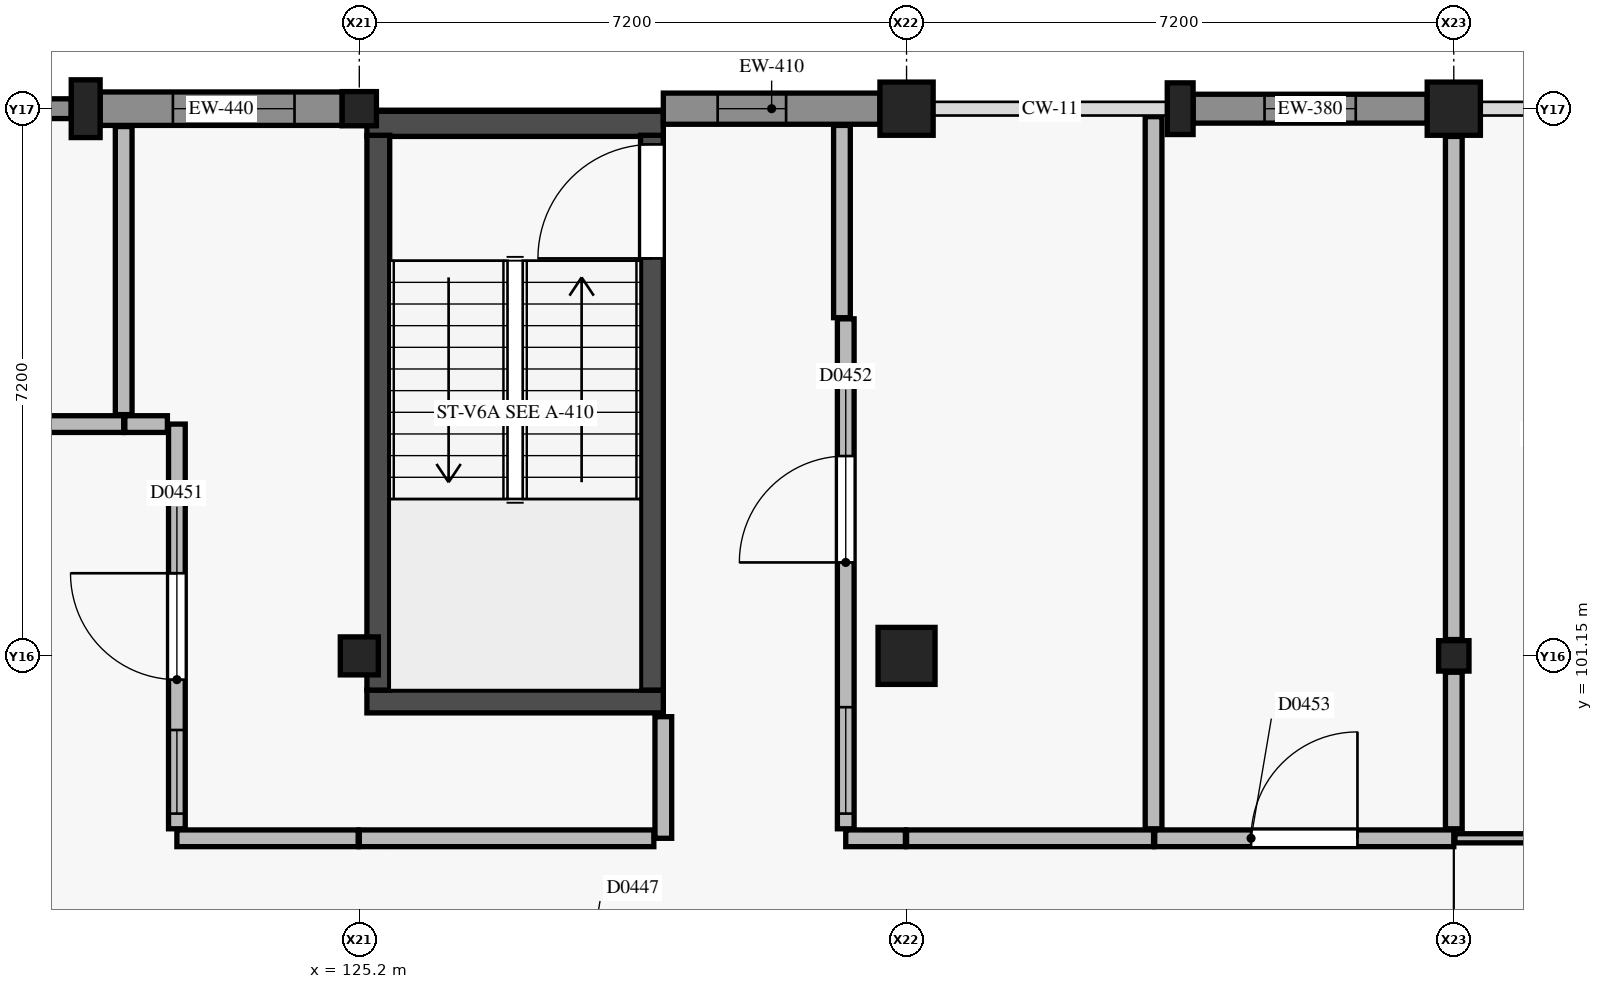
"""IFC4 building model, lengths in metres.
Left out: names, types, materials, properties, quantities, classifications, styles, units other than length and angle.
Written with IfcOpenShell. Run it as: python <this file> out.ifc"""

import sys

from ifc_helpers import new_model, si_unit, direction, frame, frame_2d, origin, origin_2d, place, context, subcontext, project, spatial, rectangle, circle, extrude, element, fill, save


model = new_model("IFC4")
c1 = context("Model", 3, precision=1e-05, world=origin(), true_north=direction((0.0, 1.0)))
c2 = subcontext(c1, "Body", "Model", "MODEL_VIEW")
j1 = project(units=[si_unit("LENGTHUNIT", "METRE"), si_unit("PLANEANGLEUNIT", "RADIAN")], contexts=[c1])
p1 = place(None, origin())
s1 = spatial("IfcSite", under=j1, at=p1, CompositionType="ELEMENT")
p2 = place(p1, origin())
s2 = spatial("IfcBuilding", under=s1, at=p2, CompositionType="ELEMENT")
p3 = place(p2, frame((0.0, 0.0, 4.8)))
s3 = spatial("IfcBuildingStorey", under=s2, at=p3, CompositionType="ELEMENT", Elevation=4.8)
p4 = place(p3, frame((125.2, 101.15, 0.0), z_axis=(0.0, 0.0, 1.0), x_axis=(1.0, 0.0, 0.0)))
e1 = element("IfcColumn", 1, at=p4, inside=s3, PredefinedType="COLUMN", context=c2, shape_type="SweptSolid", body=[
    extrude(rectangle(XDim=0.5, YDim=0.5, at=origin_2d()), origin(), (0.0, 0.0, 1.0), 4.2),
])
p5 = place(p3, frame((125.2, 108.35, 0.0), z_axis=(0.0, 0.0, 1.0), x_axis=(1.0, 0.0, 0.0)))
e2 = element("IfcColumn", 2, at=p5, inside=s3, PredefinedType="COLUMN", context=c2, shape_type="SweptSolid", body=[
    extrude(rectangle(XDim=0.45, YDim=0.45, at=origin_2d()), origin(), (0.0, 0.0, 1.0), 4.2),
])
p6 = place(p3, frame((132.4, 101.15, 0.0), z_axis=(0.0, 0.0, 1.0), x_axis=(1.0, 0.0, 0.0)))
e3 = element("IfcColumn", 3, at=p6, inside=s3, PredefinedType="COLUMN", context=c2, shape_type="SweptSolid", body=[
    extrude(rectangle(XDim=0.75, YDim=0.75, at=origin_2d()), origin(), (0.0, 0.0, 1.0), 4.2),
])
p7 = place(p3, frame((132.4, 108.35, 0.0), z_axis=(0.0, 0.0, 1.0), x_axis=(1.0, 0.0, 0.0)))
e4 = element("IfcColumn", 4, at=p7, inside=s3, PredefinedType="COLUMN", context=c2, shape_type="SweptSolid", body=[
    extrude(rectangle(XDim=0.7, YDim=0.7, at=origin_2d()), origin(), (0.0, 0.0, 1.0), 4.2),
])
p8 = place(p3, frame((139.6, 101.15, 0.0), z_axis=(0.0, 0.0, 1.0), x_axis=(1.0, 0.0, 0.0)))
e5 = element("IfcColumn", 5, at=p8, inside=s3, PredefinedType="COLUMN", context=c2, shape_type="SweptSolid", body=[
    extrude(rectangle(XDim=0.4, YDim=0.4, at=origin_2d()), origin(), (0.0, 0.0, 1.0), 4.2),
])
p9 = place(p3, frame((139.6, 108.35, 0.0), z_axis=(0.0, 0.0, 1.0), x_axis=(1.0, 0.0, 0.0)))
e6 = element("IfcColumn", 6, at=p9, inside=s3, PredefinedType="COLUMN", context=c2, shape_type="SweptSolid", body=[
    extrude(circle(Radius=0.35, at=origin_2d()), origin(), (0.0, 0.0, 1.0), 4.2),
])
p10 = place(p3, frame((121.6, 108.35, 0.0), z_axis=(0.0, 0.0, 1.0), x_axis=(1.0, 0.0, 0.0)))
e7 = element("IfcColumn", 7, at=p10, inside=s3, PredefinedType="PILASTER", context=c2, shape_type="SweptSolid", body=[
    extrude(rectangle(XDim=0.38, YDim=0.76, at=origin_2d()), origin(), (0.0, 0.0, 1.0), 4.2),
])
p11 = place(p3, frame((136.0, 108.35, 0.0), z_axis=(0.0, 0.0, 1.0), x_axis=(1.0, 0.0, 0.0)))
e8 = element("IfcColumn", 8, at=p11, inside=s3, PredefinedType="PILASTER", context=c2, shape_type="SweptSolid", body=[
    extrude(rectangle(XDim=0.34, YDim=0.68, at=origin_2d()), origin(), (0.0, 0.0, 1.0), 4.2),
])
p12 = place(p3, frame((125.3, 100.55, 0.0), z_axis=(0.0, 0.0, 1.0), x_axis=(1.0, 0.0, 0.0)))
e9 = element("IfcWall", 9, at=p12, inside=s3, PredefinedType="SHEAR", context=c2, shape_type="SweptSolid", body=[
    extrude(rectangle(XDim=3.9, YDim=0.3, at=frame_2d((1.95, 0.0))), origin(), (0.0, 0.0, 1.0), 3.95),
])
p13 = place(p3, frame((125.3, 108.15, 0.0), z_axis=(0.0, 0.0, 1.0), x_axis=(1.0, 0.0, 0.0)))
e10 = element("IfcWall", 10, at=p13, inside=s3, PredefinedType="SHEAR", context=c2, shape_type="SweptSolid", body=[
    extrude(rectangle(XDim=3.9, YDim=0.33, at=frame_2d((1.95, 0.0))), origin(), (0.0, 0.0, 1.0), 3.95),
])
p14 = place(p3, frame((125.45, 100.7, 0.0), z_axis=(0.0, 0.0, 1.0), x_axis=(0.0, 1.0, 0.0)))
e11 = element("IfcWall", 11, at=p14, inside=s3, PredefinedType="SHEAR", context=c2, shape_type="SweptSolid", body=[
    extrude(rectangle(XDim=7.3, YDim=0.3, at=frame_2d((3.65, 0.0))), origin(), (0.0, 0.0, 1.0), 3.95),
])
p15 = place(p3, frame((129.05, 100.7, 0.0), z_axis=(0.0, 0.0, 1.0), x_axis=(0.0, 1.0, 0.0)))
e12 = element("IfcWall", 12, at=p15, inside=s3, PredefinedType="SHEAR", context=c2, shape_type="SweptSolid", body=[
    extrude(rectangle(XDim=7.3, YDim=0.3, at=frame_2d((3.65, 0.0))), origin(), (0.0, 0.0, 1.0), 3.95),
])
p16 = place(p15, frame((5.68, 0.0, 0.0)))
e13 = element("IfcOpeningElement", 13, at=p16, cuts=e12, PredefinedType="OPENING", context=c2, shape_type="SweptSolid", body=[
    extrude(rectangle(XDim=1.5, YDim=2.15, at=frame_2d((0.75, 1.075))), frame((0.0, 0.16, 0.0), z_axis=(0.0, -1.0, 0.0), x_axis=(1.0, 0.0, 0.0)), (0.0, 0.0, 1.0), 0.32),
])
p17 = place(p3, frame((118.3, 108.35, 0.0), z_axis=(0.0, 0.0, 1.0), x_axis=(1.0, 0.0, 0.0)))
e14 = element("IfcWall", 14, at=p17, inside=s3, PredefinedType="SOLIDWALL", context=c2, shape_type="SweptSolid", body=[
    extrude(rectangle(XDim=3.11, YDim=0.26, at=frame_2d((1.555, 0.0))), origin(), (0.0, 0.0, 1.0), 3.13),
])
p18 = place(p17, frame((0.855, 0.0, 0.9)))
e15 = element("IfcOpeningElement", 15, at=p18, cuts=e14, PredefinedType="OPENING", context=c2, shape_type="SweptSolid", body=[
    extrude(rectangle(XDim=1.4, YDim=1.8, at=frame_2d((0.7, 0.9))), frame((0.0, 0.14, 0.0), z_axis=(0.0, -1.0, 0.0), x_axis=(1.0, 0.0, 0.0)), (0.0, 0.0, 1.0), 0.28),
])
p19 = place(p3, frame((121.79, 108.35, 0.0), z_axis=(0.0, 0.0, 1.0), x_axis=(1.0, 0.0, 0.0)))
e16 = element("IfcWall", 16, at=p19, inside=s3, PredefinedType="USERDEFINED", context=c2, shape_type="SweptSolid", body=[
    extrude(rectangle(XDim=3.185, YDim=0.44, at=frame_2d((1.593, 0.0))), origin(), (0.0, 0.0, 1.0), 3.13),
])
p20 = place(p19, frame((0.958, 0.0, 0.9)))
e17 = element("IfcOpeningElement", 17, at=p20, cuts=e16, PredefinedType="OPENING", context=c2, shape_type="SweptSolid", body=[
    extrude(rectangle(XDim=1.6, YDim=1.8, at=frame_2d((0.8, 0.9))), frame((0.0, 0.23, 0.0), z_axis=(0.0, -1.0, 0.0), x_axis=(1.0, 0.0, 0.0)), (0.0, 0.0, 1.0), 0.46),
])
p21 = place(p3, frame((129.2, 108.35, 0.0), z_axis=(0.0, 0.0, 1.0), x_axis=(1.0, 0.0, 0.0)))
e18 = element("IfcWall", 18, at=p21, inside=s3, PredefinedType="USERDEFINED", context=c2, shape_type="SweptSolid", body=[
    extrude(rectangle(XDim=2.85, YDim=0.41, at=frame_2d((1.425, 0.0))), origin(), (0.0, 0.0, 1.0), 3.13),
])
p22 = place(p21, frame((0.715, 0.0, 0.95)))
e19 = element("IfcOpeningElement", 19, at=p22, cuts=e18, PredefinedType="OPENING", context=c2, shape_type="SweptSolid", body=[
    extrude(rectangle(XDim=0.9, YDim=1.2, at=frame_2d((0.45, 0.6))), frame((0.0, 0.215, 0.0), z_axis=(0.0, -1.0, 0.0), x_axis=(1.0, 0.0, 0.0)), (0.0, 0.0, 1.0), 0.43),
])
p23 = place(p3, frame((136.17, 108.35, 0.0), z_axis=(0.0, 0.0, 1.0), x_axis=(1.0, 0.0, 0.0)))
e20 = element("IfcWall", 20, at=p23, inside=s3, PredefinedType="USERDEFINED", context=c2, shape_type="SweptSolid", body=[
    extrude(rectangle(XDim=3.08, YDim=0.38, at=frame_2d((1.54, 0.0))), origin(), (0.0, 0.0, 1.0), 3.13),
])
p24 = place(p23, frame((0.94, 0.0, 0.9)))
e21 = element("IfcOpeningElement", 21, at=p24, cuts=e20, PredefinedType="OPENING", context=c2, shape_type="SweptSolid", body=[
    extrude(rectangle(XDim=1.2, YDim=1.5, at=frame_2d((0.6, 0.75))), frame((0.0, 0.2, 0.0), z_axis=(0.0, -1.0, 0.0), x_axis=(1.0, 0.0, 0.0)), (0.0, 0.0, 1.0), 0.4),
])
p25 = place(p3, frame((120.4, 104.2, 0.0), z_axis=(0.0, 0.0, 1.0), x_axis=(1.0, 0.0, 0.0)))
e22 = element("IfcWall", 22, at=p25, inside=s3, PredefinedType="PARTITIONING", context=c2, shape_type="SweptSolid", body=[
    extrude(rectangle(XDim=1.7, YDim=0.22, at=frame_2d((0.85, 0.0))), origin(), (0.0, 0.0, 1.0), 3.95),
])
p26 = place(p3, frame((129.2, 98.75, 0.0), z_axis=(0.0, 0.0, 1.0), x_axis=(0.0, 1.0, 0.0)))
e23 = element("IfcWall", 23, at=p26, inside=s3, PredefinedType="PARTITIONING", context=c2, shape_type="SweptSolid", body=[
    extrude(rectangle(XDim=1.6, YDim=0.22, at=frame_2d((0.8, 0.0))), origin(), (0.0, 0.0, 1.0), 3.515),
])
p27 = place(p3, frame((125.2, 98.75, 0.0), z_axis=(0.0, 0.0, 1.0), x_axis=(1.0, 0.0, 0.0)))
e24 = element("IfcWall", 24, at=p27, inside=s3, PredefinedType="PARTITIONING", context=c2, shape_type="SweptSolid", body=[
    extrude(rectangle(XDim=3.875, YDim=0.22, at=frame_2d((1.938, 0.0))), origin(), (0.0, 0.0, 1.0), 3.355),
])
p28 = place(p3, frame((122.8, 98.75, 0.0), z_axis=(0.0, 0.0, 1.0), x_axis=(1.0, 0.0, 0.0)))
e25 = element("IfcWall", 25, at=p28, inside=s3, PredefinedType="PARTITIONING", context=c2, shape_type="SweptSolid", body=[
    extrude(rectangle(XDim=2.385, YDim=0.22, at=frame_2d((1.192, 0.0))), origin(), (0.0, 0.0, 1.0), 3.355),
])
p29 = place(p3, frame((122.8, 98.875, 0.0), z_axis=(0.0, 0.0, 1.0), x_axis=(0.0, 1.0, 0.0)))
e26 = element("IfcWall", 26, at=p29, inside=s3, PredefinedType="PARTITIONING", context=c2, shape_type="SweptSolid", body=[
    extrude(rectangle(XDim=5.325, YDim=0.22, at=frame_2d((2.663, 0.0))), origin(), (0.0, 0.0, 1.0), 3.285),
])
p30 = place(p29, frame((1.962, 0.0, 0.0)))
e27 = element("IfcOpeningElement", 27, at=p30, cuts=e26, PredefinedType="OPENING", context=c2, shape_type="SweptSolid", body=[
    extrude(rectangle(XDim=1.4, YDim=2.2, at=frame_2d((0.7, 1.1))), frame((0.0, 0.12, 0.0), z_axis=(0.0, -1.0, 0.0), x_axis=(1.0, 0.0, 0.0)), (0.0, 0.0, 1.0), 0.24),
])
p31 = place(p29, frame((0.2, 0.0, 1.05)))
e28 = element("IfcOpeningElement", 28, at=p31, cuts=e26, PredefinedType="OPENING", context=c2, shape_type="SweptSolid", body=[
    extrude(rectangle(XDim=1.1, YDim=1.1, at=frame_2d((0.55, 0.55))), frame((0.0, 0.12, 0.0), z_axis=(0.0, -1.0, 0.0), x_axis=(1.0, 0.0, 0.0)), (0.0, 0.0, 1.0), 0.24),
])
p32 = place(p3, frame((122.115, 104.2, 0.0), z_axis=(0.0, 0.0, 1.0), x_axis=(1.0, 0.0, 0.0)))
e29 = element("IfcWall", 29, at=p32, inside=s3, PredefinedType="PARTITIONING", context=c2, shape_type="SweptSolid", body=[
    extrude(rectangle(XDim=0.56, YDim=0.22, at=frame_2d((0.28, 0.0))), origin(), (0.0, 0.0, 1.0), 3.95),
])
p33 = place(p3, frame((131.55, 105.6, 0.0), z_axis=(0.0, 0.0, 1.0), x_axis=(0.0, 1.0, 0.0)))
e30 = element("IfcWall", 30, at=p33, inside=s3, PredefinedType="PARTITIONING", context=c2, shape_type="SweptSolid", body=[
    extrude(rectangle(XDim=2.53, YDim=0.22, at=frame_2d((1.265, 0.0))), origin(), (0.0, 0.0, 1.0), 3.95),
])
p34 = place(p3, frame((132.4, 98.75, 0.0), z_axis=(0.0, 0.0, 1.0), x_axis=(1.0, 0.0, 0.0)))
e31 = element("IfcWall", 31, at=p34, inside=s3, PredefinedType="PARTITIONING", context=c2, shape_type="SweptSolid", body=[
    extrude(rectangle(XDim=3.25, YDim=0.22, at=frame_2d((1.625, 0.0))), origin(), (0.0, 0.0, 1.0), 3.135),
])
p35 = place(p3, frame((131.6, 98.75, 0.0), z_axis=(0.0, 0.0, 1.0), x_axis=(1.0, 0.0, 0.0)))
e32 = element("IfcWall", 32, at=p35, inside=s3, PredefinedType="PARTITIONING", context=c2, shape_type="SweptSolid", body=[
    extrude(rectangle(XDim=0.785, YDim=0.22, at=frame_2d((0.393, 0.0))), origin(), (0.0, 0.0, 1.0), 3.135),
])
p36 = place(p3, frame((131.6, 98.875, 0.0), z_axis=(0.0, 0.0, 1.0), x_axis=(0.0, 1.0, 0.0)))
e33 = element("IfcWall", 33, at=p36, inside=s3, PredefinedType="PARTITIONING", context=c2, shape_type="SweptSolid", body=[
    extrude(rectangle(XDim=6.71, YDim=0.22, at=frame_2d((3.355, 0.0))), origin(), (0.0, 0.0, 1.0), 3.95),
])
p37 = place(p36, frame((3.505, 0.0, 0.0)))
e34 = element("IfcOpeningElement", 34, at=p37, cuts=e33, PredefinedType="OPENING", context=c2, shape_type="SweptSolid", body=[
    extrude(rectangle(XDim=1.4, YDim=2.2, at=frame_2d((0.7, 1.1))), frame((0.0, 0.12, 0.0), z_axis=(0.0, -1.0, 0.0), x_axis=(1.0, 0.0, 0.0)), (0.0, 0.0, 1.0), 0.24),
])
p38 = place(p36, frame((0.2, 0.0, 1.05)))
e35 = element("IfcOpeningElement", 35, at=p38, cuts=e33, PredefinedType="OPENING", context=c2, shape_type="SweptSolid", body=[
    extrude(rectangle(XDim=1.4, YDim=1.1, at=frame_2d((0.7, 0.55))), frame((0.0, 0.12, 0.0), z_axis=(0.0, -1.0, 0.0), x_axis=(1.0, 0.0, 0.0)), (0.0, 0.0, 1.0), 0.24),
])
p39 = place(p3, frame((135.665, 98.75, 0.0), z_axis=(0.0, 0.0, 1.0), x_axis=(1.0, 0.0, 0.0)))
e36 = element("IfcWall", 36, at=p39, inside=s3, PredefinedType="PARTITIONING", context=c2, shape_type="SweptSolid", body=[
    extrude(rectangle(XDim=3.935, YDim=0.22, at=frame_2d((1.968, 0.0))), origin(), (0.0, 0.0, 1.0), 3.355),
])
p40 = place(p39, frame((1.268, 0.0, 0.0)))
e37 = element("IfcOpeningElement", 37, at=p40, cuts=e36, PredefinedType="OPENING", context=c2, shape_type="SweptSolid", body=[
    extrude(rectangle(XDim=1.4, YDim=2.2, at=frame_2d((0.7, 1.1))), frame((0.0, 0.12, 0.0), z_axis=(0.0, -1.0, 0.0), x_axis=(1.0, 0.0, 0.0)), (0.0, 0.0, 1.0), 0.24),
])
p41 = place(p3, frame((139.615, 98.75, 0.0), z_axis=(0.0, 0.0, 1.0), x_axis=(1.0, 0.0, 0.0)))
e38 = element("IfcWall", 38, at=p41, inside=s3, PredefinedType="PARTITIONING", context=c2, shape_type="SweptSolid", body=[
    extrude(rectangle(XDim=4.71, YDim=0.12, at=frame_2d((2.355, 0.0))), origin(), (0.0, 0.0, 1.0), 3.355),
])
p42 = place(p41, frame((1.88, 0.0, 0.0)))
e39 = element("IfcOpeningElement", 39, at=p42, cuts=e38, PredefinedType="OPENING", context=c2, shape_type="SweptSolid", body=[
    extrude(rectangle(XDim=0.95, YDim=2.1, at=frame_2d((0.475, 1.05))), frame((0.0, 0.07, 0.0), z_axis=(0.0, -1.0, 0.0), x_axis=(1.0, 0.0, 0.0)), (0.0, 0.0, 1.0), 0.14),
])
p43 = place(p3, frame((122.1, 104.325, 0.0), z_axis=(0.0, 0.0, 1.0), x_axis=(0.0, 1.0, 0.0)))
e40 = element("IfcWall", 40, at=p43, inside=s3, PredefinedType="PARTITIONING", context=c2, shape_type="SweptSolid", body=[
    extrude(rectangle(XDim=3.79, YDim=0.22, at=frame_2d((1.895, 0.0))), origin(), (0.0, 0.0, 1.0), 3.515),
])
p44 = place(p3, frame((139.6, 98.875, 0.0), z_axis=(0.0, 0.0, 1.0), x_axis=(0.0, 1.0, 0.0)))
e41 = element("IfcWall", 41, at=p44, inside=s3, PredefinedType="PARTITIONING", context=c2, shape_type="SweptSolid", body=[
    extrude(rectangle(XDim=2.06, YDim=0.22, at=frame_2d((1.03, 0.0))), origin(), (0.0, 0.0, 1.0), 3.355),
])
p45 = place(p3, frame((139.6, 101.365, 0.0), z_axis=(0.0, 0.0, 1.0), x_axis=(0.0, 1.0, 0.0)))
e42 = element("IfcWall", 42, at=p45, inside=s3, PredefinedType="PARTITIONING", context=c2, shape_type="SweptSolid", body=[
    extrude(rectangle(XDim=6.62, YDim=0.22, at=frame_2d((3.31, 0.0))), origin(), (0.0, 0.0, 1.0), 3.385),
])
p46 = place(p3, frame((135.65, 98.875, 0.0), z_axis=(0.0, 0.0, 1.0), x_axis=(0.0, 1.0, 0.0)))
e43 = element("IfcWall", 43, at=p46, inside=s3, PredefinedType="PARTITIONING", context=c2, shape_type="SweptSolid", body=[
    extrude(rectangle(XDim=9.37, YDim=0.22, at=frame_2d((4.685, 0.0))), origin(), (0.0, 0.0, 1.0), 3.355),
])
p47 = place(p20, origin())
e44 = element("IfcWindow", 44, at=p47, inside=s3, PartitioningType="SINGLE_PANEL", PredefinedType="WINDOW", context=c2, shape_type="SweptSolid", body=[
    extrude(rectangle(XDim=1.6, YDim=1.8, at=frame_2d((0.8, 0.9))), frame((0.0, 0.03, 0.0), z_axis=(0.0, -1.0, 0.0), x_axis=(1.0, 0.0, 0.0)), (0.0, 0.0, 1.0), 0.06),
])
fill(e17, e44)
p48 = place(p22, origin())
e45 = element("IfcWindow", 45, at=p48, inside=s3, PartitioningType="SINGLE_PANEL", PredefinedType="WINDOW", context=c2, shape_type="SweptSolid", body=[
    extrude(rectangle(XDim=0.9, YDim=1.2, at=frame_2d((0.45, 0.6))), frame((0.0, 0.03, 0.0), z_axis=(0.0, -1.0, 0.0), x_axis=(1.0, 0.0, 0.0)), (0.0, 0.0, 1.0), 0.06),
])
fill(e19, e45)
p49 = place(p24, origin())
e46 = element("IfcWindow", 46, at=p49, inside=s3, PartitioningType="SINGLE_PANEL", PredefinedType="WINDOW", context=c2, shape_type="SweptSolid", body=[
    extrude(rectangle(XDim=1.2, YDim=1.5, at=frame_2d((0.6, 0.75))), frame((0.0, 0.03, 0.0), z_axis=(0.0, -1.0, 0.0), x_axis=(1.0, 0.0, 0.0)), (0.0, 0.0, 1.0), 0.06),
])
fill(e21, e46)
p50 = place(p16, origin())
e47 = element("IfcDoor", 47, at=p50, inside=s3, OperationType="SINGLE_SWING_LEFT", PredefinedType="DOOR", context=c2, shape_type="SweptSolid", body=[
    extrude(rectangle(XDim=1.5, YDim=2.15, at=frame_2d((0.75, 1.075))), frame((0.0, 0.025, 0.0), z_axis=(0.0, -1.0, 0.0), x_axis=(1.0, 0.0, 0.0)), (0.0, 0.0, 1.0), 0.05),
])
fill(e13, e47)
p51 = place(p30, origin())
e48 = element("IfcDoor", 48, at=p51, inside=s3, OperationType="SINGLE_SWING_RIGHT", PredefinedType="DOOR", context=c2, shape_type="SweptSolid", body=[
    extrude(rectangle(XDim=1.4, YDim=2.2, at=frame_2d((0.7, 1.1))), frame((0.0, 0.025, 0.0), z_axis=(0.0, -1.0, 0.0), x_axis=(1.0, 0.0, 0.0)), (0.0, 0.0, 1.0), 0.05),
])
fill(e27, e48)
p52 = place(p31, origin())
e49 = element("IfcWindow", 49, at=p52, inside=s3, PartitioningType="SINGLE_PANEL", PredefinedType="WINDOW", context=c2, shape_type="SweptSolid", body=[
    extrude(rectangle(XDim=1.1, YDim=1.1, at=frame_2d((0.55, 0.55))), frame((0.0, 0.03, 0.0), z_axis=(0.0, -1.0, 0.0), x_axis=(1.0, 0.0, 0.0)), (0.0, 0.0, 1.0), 0.06),
])
fill(e28, e49)
p53 = place(p37, origin())
e50 = element("IfcDoor", 50, at=p53, inside=s3, OperationType="SINGLE_SWING_LEFT", PredefinedType="DOOR", context=c2, shape_type="SweptSolid", body=[
    extrude(rectangle(XDim=1.4, YDim=2.2, at=frame_2d((0.7, 1.1))), frame((0.0, 0.025, 0.0), z_axis=(0.0, -1.0, 0.0), x_axis=(1.0, 0.0, 0.0)), (0.0, 0.0, 1.0), 0.05),
])
fill(e34, e50)
p54 = place(p38, origin())
e51 = element("IfcWindow", 51, at=p54, inside=s3, PartitioningType="SINGLE_PANEL", PredefinedType="WINDOW", context=c2, shape_type="SweptSolid", body=[
    extrude(rectangle(XDim=1.4, YDim=1.1, at=frame_2d((0.7, 0.55))), frame((0.0, 0.03, 0.0), z_axis=(0.0, -1.0, 0.0), x_axis=(1.0, 0.0, 0.0)), (0.0, 0.0, 1.0), 0.06),
])
fill(e35, e51)
p55 = place(p40, origin())
e52 = element("IfcDoor", 52, at=p55, inside=s3, OperationType="SINGLE_SWING_RIGHT", PredefinedType="DOOR", context=c2, shape_type="SweptSolid", body=[
    extrude(rectangle(XDim=1.4, YDim=2.2, at=frame_2d((0.7, 1.1))), frame((0.0, 0.025, 0.0), z_axis=(0.0, -1.0, 0.0), x_axis=(1.0, 0.0, 0.0)), (0.0, 0.0, 1.0), 0.05),
])
fill(e37, e52)
save(model, sys.argv[1])
